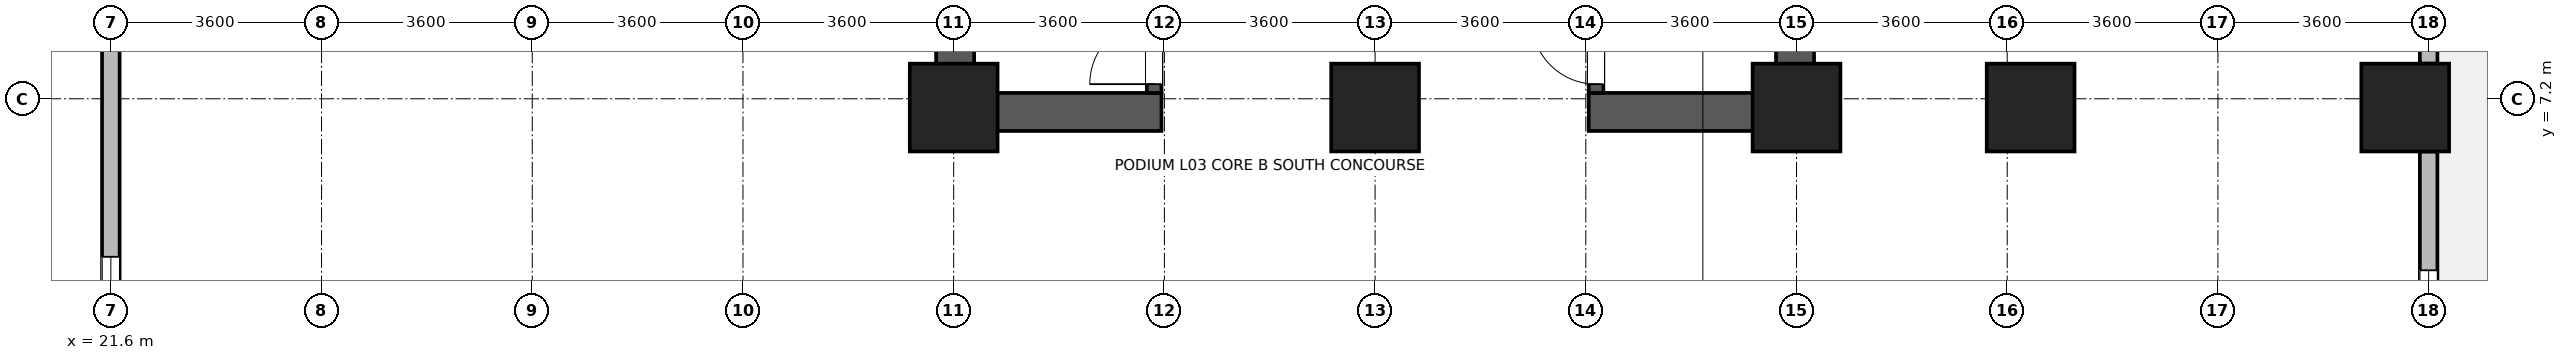
"""IFC4 building model, lengths in metres.
Left out: names, types, materials, properties, quantities, classifications, styles, units other than length and angle.
Written with IfcOpenShell. Run it as: python <this file> out.ifc"""

import sys

from ifc_helpers import new_model, si_unit, direction, frame, frame_2d, origin, origin_2d, place, context, subcontext, project, spatial, rectangle, extrude, source, transform, mapped, element, fill, save


model = new_model("IFC4")
c1 = context("Model", 3, precision=1e-05, world=origin(), true_north=direction((0.0, 1.0)))
c2 = subcontext(c1, "Body", "Model", "MODEL_VIEW")
j1 = project(units=[si_unit("LENGTHUNIT", "METRE"), si_unit("PLANEANGLEUNIT", "RADIAN")], contexts=[c1])
p1 = place(None, origin())
s1 = spatial("IfcSite", under=j1, at=p1, CompositionType="ELEMENT")
p2 = place(p1, origin())
s2 = spatial("IfcBuilding", under=s1, at=p2, CompositionType="ELEMENT")
p3 = place(p2, frame((0.0, 0.0, 15.0)))
s3 = spatial("IfcBuildingStorey", under=s2, at=p3, CompositionType="ELEMENT", Elevation=15.0)
for number, where, z_axis, x_axis in (
    (1, (36.025, 6.65, 0.0), (0.0, 0.0, 1.0), (0.0, 1.0, 0.0)),
    (2, (50.375, 6.65, 0.0), (0.0, 0.0, 1.0), (0.0, 1.0, 0.0)),
):
    element("IfcWall", number, at=place(p3, frame(where, z_axis=z_axis, x_axis=x_axis)), inside=s3, PredefinedType="SHEAR", context=c2, shape_type="SweptSolid", body=[
        extrude(rectangle(XDim=8.3, YDim=0.65, at=frame_2d((4.15, 0.0))), origin(), (0.0, 0.0, 1.0), 4.38),
    ])
for number, where, z_axis, x_axis in (
    (3, (36.35, 6.975, 0.0), (0.0, 0.0, 1.0), (1.0, 0.0, 0.0)),
    (4, (46.85, 6.975, 0.0), (0.0, 0.0, 1.0), (1.0, 0.0, 0.0)),
):
    element("IfcWall", number, at=place(p3, frame(where, z_axis=z_axis, x_axis=x_axis)), inside=s3, PredefinedType="SHEAR", context=c2, shape_type="SweptSolid", body=[
        extrude(rectangle(XDim=3.2, YDim=0.65, at=frame_2d((1.6, 0.0))), origin(), (0.0, 0.0, 1.0), 4.38),
    ])
p4 = place(p3, frame((39.425, 7.3, 0.0), z_axis=(0.0, 0.0, 1.0), x_axis=(0.0, 1.0, 0.0)))
e5 = element("IfcWall", 5, at=p4, inside=s3, PredefinedType="SHEAR", context=c2, shape_type="SweptSolid", body=[
    extrude(rectangle(XDim=7.0, YDim=0.25, at=frame_2d((3.5, 0.0))), origin(), (0.0, 0.0, 1.0), 4.38),
])
p5 = place(p4, frame((0.15, 0.0, 0.0)))
e6 = element("IfcOpeningElement", 6, at=p5, cuts=e5, PredefinedType="OPENING", context=c2, shape_type="SweptSolid", body=[
    extrude(rectangle(XDim=1.1, YDim=2.08, at=frame_2d((0.55, 1.04))), frame((0.0, 0.135, 0.0), z_axis=(0.0, -1.0, 0.0), x_axis=(1.0, 0.0, 0.0)), (0.0, 0.0, 1.0), 0.27),
])
p6 = place(p3, frame((46.975, 7.3, 0.0), z_axis=(0.0, 0.0, 1.0), x_axis=(0.0, 1.0, 0.0)))
e7 = element("IfcWall", 7, at=p6, inside=s3, PredefinedType="SHEAR", context=c2, shape_type="SweptSolid", body=[
    extrude(rectangle(XDim=7.0, YDim=0.25, at=frame_2d((3.5, 0.0))), origin(), (0.0, 0.0, 1.0), 4.38),
])
p7 = place(p6, frame((0.15, 0.0, 0.0)))
e8 = element("IfcOpeningElement", 8, at=p7, cuts=e7, PredefinedType="OPENING", context=c2, shape_type="SweptSolid", body=[
    extrude(rectangle(XDim=1.1, YDim=2.08, at=frame_2d((0.55, 1.04))), frame((0.0, 0.135, 0.0), z_axis=(0.0, -1.0, 0.0), x_axis=(1.0, 0.0, 0.0)), (0.0, 0.0, 1.0), 0.27),
])
m1 = source(origin(), c2, "Body", "SweptSolid", [
    extrude(rectangle(XDim=1.5, YDim=1.5, at=origin_2d()), origin(), (0.0, 0.0, 1.0), 4.8),
])
for number, where, z_axis, x_axis in (
    (9, (36.0, 7.05, 0.0), (0.0, 0.0, 1.0), (1.0, 0.0, 0.0)),
    (10, (43.2, 7.05, 0.0), (0.0, 0.0, 1.0), (1.0, 0.0, 0.0)),
    (11, (50.4, 7.05, 0.0), (0.0, 0.0, 1.0), (1.0, 0.0, 0.0)),
    (12, (54.4, 7.05, 0.0), (0.0, 0.0, 1.0), (1.0, 0.0, 0.0)),
    (13, (60.8, 7.05, 0.0), (0.0, 0.0, 1.0), (1.0, 0.0, 0.0)),
):
    element("IfcColumn", number, at=place(p3, frame(where, z_axis=z_axis, x_axis=x_axis)), inside=s3, PredefinedType="COLUMN", context=c2, shape_type="MappedRepresentation", body=[
        mapped(m1, transform((0.0, 0.0, 0.0), x_axis=(1.0, 0.0, 0.0), y_axis=(0.0, 1.0, 0.0), z_axis=(0.0, 0.0, 1.0), scale=1.0)),
    ])
p8 = place(p3, frame((61.2, 6.299, 0.0), z_axis=(0.0, 0.0, 1.0), x_axis=(0.0, -1.0, 0.0)))
e14 = element("IfcWall", 14, at=p8, inside=s3, PredefinedType="STANDARD", context=c2, shape_type="SweptSolid", body=[
    extrude(rectangle(XDim=3.348, YDim=0.3, at=frame_2d((1.674, 0.0))), origin(), (0.0, 0.0, 1.0), 4.36),
])
p9 = place(p8, frame((2.029, 0.0, 0.9)))
e15 = element("IfcOpeningElement", 15, at=p9, cuts=e14, PredefinedType="OPENING", context=c2, shape_type="SweptSolid", body=[
    extrude(rectangle(XDim=0.95, YDim=1.75, at=frame_2d((0.475, 0.875))), frame((0.0, 0.16, 0.0), z_axis=(0.0, -1.0, 0.0), x_axis=(1.0, 0.0, 0.0)), (0.0, 0.0, 1.0), 0.32),
])
p10 = place(p3, frame((61.2, 13.799, 0.0), z_axis=(0.0, 0.0, 1.0), x_axis=(0.0, -1.0, 0.0)))
e16 = element("IfcWall", 16, at=p10, inside=s3, PredefinedType="STANDARD", context=c2, shape_type="SweptSolid", body=[
    extrude(rectangle(XDim=5.998, YDim=0.3, at=frame_2d((2.999, 0.0))), origin(), (0.0, 0.0, 1.0), 4.36),
])
p11 = place(p10, frame((2.099, 0.0, 0.0)))
e17 = element("IfcOpeningElement", 17, at=p11, cuts=e16, PredefinedType="OPENING", context=c2, shape_type="SweptSolid", body=[
    extrude(rectangle(XDim=1.8, YDim=2.2, at=frame_2d((0.9, 1.1))), frame((0.0, 0.16, 0.0), z_axis=(0.0, -1.0, 0.0), x_axis=(1.0, 0.0, 0.0)), (0.0, 0.0, 1.0), 0.32),
])
p12 = place(p3, frame((21.6, 1.65, 0.0), z_axis=(0.0, 0.0, 1.0), x_axis=(0.0, 1.0, 0.0)))
e18 = element("IfcWall", 18, at=p12, inside=s3, PredefinedType="STANDARD", context=c2, shape_type="SweptSolid", body=[
    extrude(rectangle(XDim=16.5, YDim=0.3, at=frame_2d((8.25, 0.0))), origin(), (0.0, 0.0, 1.0), 4.36),
])
p13 = place(p12, frame((0.45, 0.0, 0.9)))
e19 = element("IfcOpeningElement", 19, at=p13, cuts=e18, PredefinedType="OPENING", context=c2, shape_type="SweptSolid", body=[
    extrude(rectangle(XDim=2.4, YDim=2.5, at=frame_2d((1.2, 1.25))), frame((0.0, 0.16, 0.0), z_axis=(0.0, -1.0, 0.0), x_axis=(1.0, 0.0, 0.0)), (0.0, 0.0, 1.0), 0.32),
])
p14 = place(p12, frame((7.05, 0.0, 0.9)))
e20 = element("IfcOpeningElement", 20, at=p14, cuts=e18, PredefinedType="OPENING", context=c2, shape_type="SweptSolid", body=[
    extrude(rectangle(XDim=2.4, YDim=2.5, at=frame_2d((1.2, 1.25))), frame((0.0, 0.16, 0.0), z_axis=(0.0, -1.0, 0.0), x_axis=(1.0, 0.0, 0.0)), (0.0, 0.0, 1.0), 0.32),
])
p15 = place(p12, frame((10.35, 0.0, 0.9)))
e21 = element("IfcOpeningElement", 21, at=p15, cuts=e18, PredefinedType="OPENING", context=c2, shape_type="SweptSolid", body=[
    extrude(rectangle(XDim=2.4, YDim=2.5, at=frame_2d((1.2, 1.25))), frame((0.0, 0.16, 0.0), z_axis=(0.0, -1.0, 0.0), x_axis=(1.0, 0.0, 0.0)), (0.0, 0.0, 1.0), 0.32),
])
p16 = place(p12, frame((13.65, 0.0, 0.9)))
e22 = element("IfcOpeningElement", 22, at=p16, cuts=e18, PredefinedType="OPENING", context=c2, shape_type="SweptSolid", body=[
    extrude(rectangle(XDim=2.4, YDim=2.5, at=frame_2d((1.2, 1.25))), frame((0.0, 0.16, 0.0), z_axis=(0.0, -1.0, 0.0), x_axis=(1.0, 0.0, 0.0)), (0.0, 0.0, 1.0), 0.32),
])
p17 = place(p9, origin())
e23 = element("IfcWindow", 23, at=p17, inside=s3, PartitioningType="SINGLE_PANEL", PredefinedType="WINDOW", context=c2, shape_type="SweptSolid", body=[
    extrude(rectangle(XDim=0.95, YDim=1.75, at=frame_2d((0.475, 0.875))), frame((0.0, 0.03, 0.0), z_axis=(0.0, -1.0, 0.0), x_axis=(1.0, 0.0, 0.0)), (0.0, 0.0, 1.0), 0.06),
])
fill(e15, e23)
p18 = place(p13, origin())
e24 = element("IfcWindow", 24, at=p18, inside=s3, PartitioningType="SINGLE_PANEL", PredefinedType="WINDOW", context=c2, shape_type="SweptSolid", body=[
    extrude(rectangle(XDim=2.4, YDim=2.5, at=frame_2d((1.2, 1.25))), frame((0.0, 0.03, 0.0), z_axis=(0.0, -1.0, 0.0), x_axis=(1.0, 0.0, 0.0)), (0.0, 0.0, 1.0), 0.06),
])
fill(e19, e24)
p19 = place(p5, origin())
e25 = element("IfcDoor", 25, at=p19, inside=s3, OperationType="SINGLE_SWING_LEFT", PredefinedType="DOOR", context=c2, shape_type="SweptSolid", body=[
    extrude(rectangle(XDim=1.1, YDim=2.08, at=frame_2d((0.55, 1.04))), frame((0.0, 0.025, 0.0), z_axis=(0.0, -1.0, 0.0), x_axis=(1.0, 0.0, 0.0)), (0.0, 0.0, 1.0), 0.05),
])
fill(e6, e25)
p20 = place(p7, origin())
e26 = element("IfcDoor", 26, at=p20, inside=s3, OperationType="SINGLE_SWING_RIGHT", PredefinedType="DOOR", context=c2, shape_type="SweptSolid", body=[
    extrude(rectangle(XDim=1.1, YDim=2.08, at=frame_2d((0.55, 1.04))), frame((0.0, 0.025, 0.0), z_axis=(0.0, -1.0, 0.0), x_axis=(1.0, 0.0, 0.0)), (0.0, 0.0, 1.0), 0.05),
])
fill(e8, e26)
save(model, sys.argv[1])
